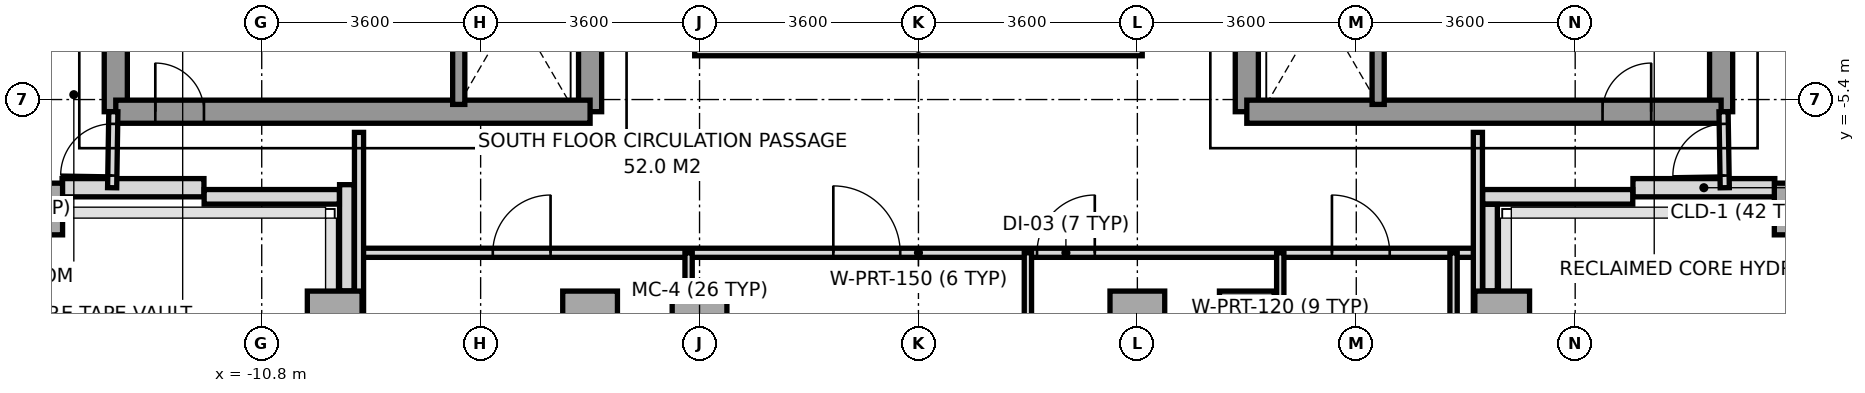
"""IFC4 building model, lengths in metres.
Left out: names, types, materials, properties, quantities, classifications, styles, units other than length and angle.
Written with IfcOpenShell. Run it as: python <this file> out.ifc"""

import sys

from ifc_helpers import new_model, si_unit, direction, frame, frame_2d, origin, origin_2d, place, context, subcontext, project, spatial, rectangle, extrude, source, transform, mapped, element, fill, save


model = new_model("IFC4")
c1 = context("Model", 3, precision=1e-05, world=origin(), true_north=direction((0.0, 1.0)))
c2 = subcontext(c1, "Body", "Model", "MODEL_VIEW")
j1 = project(units=[si_unit("LENGTHUNIT", "METRE"), si_unit("PLANEANGLEUNIT", "RADIAN")], contexts=[c1])
p1 = place(None, origin())
s1 = spatial("IfcSite", under=j1, at=p1, CompositionType="ELEMENT")
p2 = place(p1, origin())
s2 = spatial("IfcBuilding", under=s1, at=p2, CompositionType="ELEMENT")
p3 = place(p2, frame((0.0, 0.0, 180.8)))
s3 = spatial("IfcBuildingStorey", under=s2, at=p3, CompositionType="ELEMENT", Elevation=180.8)
m1 = source(origin(), c2, "Body", "SweptSolid", [
    extrude(rectangle(XDim=0.65, YDim=0.85, at=origin_2d()), origin(), (0.0, 0.0, 1.0), 3.2),
])
p4 = place(p3, frame((-14.4, -7.2, 0.0), z_axis=(0.0, 0.0, 1.0), x_axis=(1.0, 0.0, 0.0)))
e1 = element("IfcColumn", 1, at=p4, inside=s3, PredefinedType="COLUMN", context=c2, shape_type="MappedRepresentation", body=[
    mapped(m1, transform((0.0, 0.0, 0.0), x_axis=(1.0, 0.0, 0.0), y_axis=(0.0, 1.0, 0.0), z_axis=(0.0, 0.0, 1.0), scale=1.0)),
])
m2 = source(origin(), c2, "Body", "SweptSolid", [
    extrude(rectangle(XDim=0.9, YDim=0.9, at=origin_2d()), origin(), (0.0, 0.0, 1.0), 3.2),
])
for number, where, z_axis, x_axis in (
    (2, (-9.6, -9.0, 0.0), (0.0, 0.0, 1.0), (1.0, 0.0, 0.0)),
    (3, (-5.4, -9.0, 0.0), (0.0, 0.0, 1.0), (1.0, 0.0, 0.0)),
    (4, (-3.6, -9.0, 0.0), (0.0, 0.0, 1.0), (1.0, 0.0, 0.0)),
    (5, (3.6, -9.0, 0.0), (0.0, 0.0, 1.0), (1.0, 0.0, 0.0)),
    (6, (5.4, -9.0, 0.0), (0.0, 0.0, 1.0), (1.0, 0.0, 0.0)),
    (7, (9.6, -9.0, 0.0), (0.0, 0.0, 1.0), (1.0, 0.0, 0.0)),
):
    element("IfcColumn", number, at=place(p3, frame(where, z_axis=z_axis, x_axis=x_axis)), inside=s3, PredefinedType="COLUMN", context=c2, shape_type="MappedRepresentation", body=[
        mapped(m2, transform((0.0, 0.0, 0.0), x_axis=(1.0, 0.0, 0.0), y_axis=(0.0, 1.0, 0.0), z_axis=(0.0, 0.0, 1.0), scale=1.0)),
    ])
p5 = place(p3, frame((14.4, -7.2, 0.0), z_axis=(0.0, 0.0, 1.0), x_axis=(1.0, 0.0, 0.0)))
e8 = element("IfcColumn", 8, at=p5, inside=s3, PredefinedType="COLUMN", context=c2, shape_type="MappedRepresentation", body=[
    mapped(m1, transform((0.0, 0.0, 0.0), x_axis=(1.0, 0.0, 0.0), y_axis=(0.0, 1.0, 0.0), z_axis=(0.0, 0.0, 1.0), scale=1.0)),
])
for number, where, z_axis, x_axis in (
    (9, (-14.083, -6.85, 0.0), (0.0, 0.0, 1.0), (1.0, 0.0, 0.0)),
    (10, (11.75, -6.85, 0.0), (0.0, 0.0, 1.0), (1.0, 0.0, 0.0)),
):
    element("IfcWall", number, at=place(p3, frame(where, z_axis=z_axis, x_axis=x_axis)), inside=s3, PredefinedType="SOLIDWALL", context=c2, shape_type="SweptSolid", body=[
        extrude(rectangle(XDim=2.333, YDim=0.3, at=frame_2d((1.167, 0.0))), origin(), (0.0, 0.0, 1.0), 3.2),
    ])
p6 = place(p3, frame((11.747, -7.0, 0.0), z_axis=(0.0, 0.0, 1.0), x_axis=(-1.0, 0.0, 0.0)))
e11 = element("IfcWall", 11, at=p6, inside=s3, PredefinedType="PARAPET", context=c2, shape_type="SweptSolid", body=[
    extrude(rectangle(XDim=2.469, YDim=0.24, at=frame_2d((1.234, 0.0))), origin(), (0.0, 0.0, 1.0), 1.15),
])
p7 = place(p3, frame((9.4, -7.123, 0.0), z_axis=(0.0, 0.0, 1.0), x_axis=(0.0, -1.0, 0.0)))
e12 = element("IfcWall", 12, at=p7, inside=s3, PredefinedType="PARAPET", context=c2, shape_type="SweptSolid", body=[
    extrude(rectangle(XDim=1.424, YDim=0.24, at=frame_2d((0.712, 0.0))), origin(), (0.0, 0.0, 1.0), 1.15),
])
p8 = place(p3, frame((-9.4, -8.547, 0.0), z_axis=(0.0, 0.0, 1.0), x_axis=(0.0, 1.0, 0.0)))
e13 = element("IfcWall", 13, at=p8, inside=s3, PredefinedType="PARAPET", context=c2, shape_type="SweptSolid", body=[
    extrude(rectangle(XDim=1.747, YDim=0.24, at=frame_2d((0.874, 0.0))), origin(), (0.0, 0.0, 1.0), 1.15),
])
p9 = place(p3, frame((-9.523, -7.0, 0.0), z_axis=(0.0, 0.0, 1.0), x_axis=(-1.0, 0.0, 0.0)))
e14 = element("IfcWall", 14, at=p9, inside=s3, PredefinedType="PARAPET", context=c2, shape_type="SweptSolid", body=[
    extrude(rectangle(XDim=2.224, YDim=0.24, at=frame_2d((1.112, 0.0))), origin(), (0.0, 0.0, 1.0), 1.15),
])
p10 = place(p3, frame((-13.2, -5.6, 0.0), z_axis=(0.0, 0.0, 1.0), x_axis=(0.0, 1.0, 0.0)))
e15 = element("IfcWall", 15, at=p10, inside=s3, PredefinedType="SHEAR", context=c2, shape_type="SweptSolid", body=[
    extrude(rectangle(XDim=11.2, YDim=0.38, at=frame_2d((5.6, 0.0))), origin(), (0.0, 0.0, 1.0), 3.2),
])
p11 = place(p3, frame((-5.4, -5.6, 0.0), z_axis=(0.0, 0.0, 1.0), x_axis=(0.0, 1.0, 0.0)))
e16 = element("IfcWall", 16, at=p11, inside=s3, PredefinedType="SHEAR", context=c2, shape_type="SweptSolid", body=[
    extrude(rectangle(XDim=12.5, YDim=0.38, at=frame_2d((6.25, 0.0))), origin(), (0.0, 0.0, 1.0), 3.2),
])
p12 = place(p11, frame((4.55, 0.0, 0.0)))
e17 = element("IfcOpeningElement", 17, at=p12, cuts=e16, PredefinedType="OPENING", context=c2, shape_type="SweptSolid", body=[
    extrude(rectangle(XDim=1.2, YDim=2.2, at=frame_2d((0.6, 1.1))), frame((0.0, 0.2, 0.0), z_axis=(0.0, -1.0, 0.0), x_axis=(1.0, 0.0, 0.0)), (0.0, 0.0, 1.0), 0.4),
])
p13 = place(p11, frame((10.45, 0.0, 0.0)))
e18 = element("IfcOpeningElement", 18, at=p13, cuts=e16, PredefinedType="OPENING", context=c2, shape_type="SweptSolid", body=[
    extrude(rectangle(XDim=1.2, YDim=2.2, at=frame_2d((0.6, 1.1))), frame((0.0, 0.2, 0.0), z_axis=(0.0, -1.0, 0.0), x_axis=(1.0, 0.0, 0.0)), (0.0, 0.0, 1.0), 0.4),
])
p14 = place(p11, frame((6.86, 0.0, 0.0)))
e19 = element("IfcOpeningElement", 19, at=p14, cuts=e16, PredefinedType="OPENING", context=c2, shape_type="SweptSolid", body=[
    extrude(rectangle(XDim=0.8, YDim=2.1, at=frame_2d((0.4, 1.05))), frame((0.0, 0.2, 0.0), z_axis=(0.0, -1.0, 0.0), x_axis=(1.0, 0.0, 0.0)), (0.0, 0.0, 1.0), 0.4),
])
p15 = place(p11, frame((7.88, 0.0, 0.0)))
e20 = element("IfcOpeningElement", 20, at=p15, cuts=e16, PredefinedType="OPENING", context=c2, shape_type="SweptSolid", body=[
    extrude(rectangle(XDim=0.8, YDim=2.1, at=frame_2d((0.4, 1.05))), frame((0.0, 0.2, 0.0), z_axis=(0.0, -1.0, 0.0), x_axis=(1.0, 0.0, 0.0)), (0.0, 0.0, 1.0), 0.4),
])
p16 = place(p3, frame((-13.2, -5.6, 0.0), z_axis=(0.0, 0.0, 1.0), x_axis=(1.0, 0.0, 0.0)))
e21 = element("IfcWall", 21, at=p16, inside=s3, PredefinedType="SHEAR", context=c2, shape_type="SweptSolid", body=[
    extrude(rectangle(XDim=7.8, YDim=0.38, at=frame_2d((3.9, 0.0))), origin(), (0.0, 0.0, 1.0), 3.2),
])
p17 = place(p16, frame((0.65, 0.0, 0.0)))
e22 = element("IfcOpeningElement", 22, at=p17, cuts=e21, PredefinedType="OPENING", context=c2, shape_type="SweptSolid", body=[
    extrude(rectangle(XDim=0.8, YDim=2.1, at=frame_2d((0.4, 1.05))), frame((0.0, 0.2, 0.0), z_axis=(0.0, -1.0, 0.0), x_axis=(1.0, 0.0, 0.0)), (0.0, 0.0, 1.0), 0.4),
])
p18 = place(p3, frame((13.2, -5.6, 0.0), z_axis=(0.0, 0.0, 1.0), x_axis=(0.0, 1.0, 0.0)))
e23 = element("IfcWall", 23, at=p18, inside=s3, PredefinedType="SHEAR", context=c2, shape_type="SweptSolid", body=[
    extrude(rectangle(XDim=11.2, YDim=0.38, at=frame_2d((5.6, 0.0))), origin(), (0.0, 0.0, 1.0), 3.2),
])
p19 = place(p3, frame((5.4, -5.6, 0.0), z_axis=(0.0, 0.0, 1.0), x_axis=(0.0, 1.0, 0.0)))
e24 = element("IfcWall", 24, at=p19, inside=s3, PredefinedType="SHEAR", context=c2, shape_type="SweptSolid", body=[
    extrude(rectangle(XDim=12.5, YDim=0.38, at=frame_2d((6.25, 0.0))), origin(), (0.0, 0.0, 1.0), 3.2),
])
p20 = place(p19, frame((4.55, 0.0, 0.0)))
e25 = element("IfcOpeningElement", 25, at=p20, cuts=e24, PredefinedType="OPENING", context=c2, shape_type="SweptSolid", body=[
    extrude(rectangle(XDim=1.2, YDim=2.2, at=frame_2d((0.6, 1.1))), frame((0.0, 0.2, 0.0), z_axis=(0.0, -1.0, 0.0), x_axis=(1.0, 0.0, 0.0)), (0.0, 0.0, 1.0), 0.4),
])
p21 = place(p19, frame((10.45, 0.0, 0.0)))
e26 = element("IfcOpeningElement", 26, at=p21, cuts=e24, PredefinedType="OPENING", context=c2, shape_type="SweptSolid", body=[
    extrude(rectangle(XDim=1.2, YDim=2.2, at=frame_2d((0.6, 1.1))), frame((0.0, 0.2, 0.0), z_axis=(0.0, -1.0, 0.0), x_axis=(1.0, 0.0, 0.0)), (0.0, 0.0, 1.0), 0.4),
])
p22 = place(p3, frame((5.4, -5.6, 0.0), z_axis=(0.0, 0.0, 1.0), x_axis=(1.0, 0.0, 0.0)))
e27 = element("IfcWall", 27, at=p22, inside=s3, PredefinedType="SHEAR", context=c2, shape_type="SweptSolid", body=[
    extrude(rectangle(XDim=7.8, YDim=0.38, at=frame_2d((3.9, 0.0))), origin(), (0.0, 0.0, 1.0), 3.2),
])
p23 = place(p22, frame((5.85, 0.0, 0.0)))
e28 = element("IfcOpeningElement", 28, at=p23, cuts=e27, PredefinedType="OPENING", context=c2, shape_type="SweptSolid", body=[
    extrude(rectangle(XDim=0.8, YDim=2.1, at=frame_2d((0.4, 1.05))), frame((0.0, 0.2, 0.0), z_axis=(0.0, -1.0, 0.0), x_axis=(1.0, 0.0, 0.0)), (0.0, 0.0, 1.0), 0.4),
])
for number, where, z_axis, x_axis in (
    (29, (-7.56, -5.48, 0.0), (0.0, 0.0, 1.0), (0.0, 1.0, 0.0)),
    (30, (7.56, -5.48, 0.0), (0.0, 0.0, 1.0), (0.0, 1.0, 0.0)),
):
    element("IfcWall", number, at=place(p3, frame(where, z_axis=z_axis, x_axis=x_axis)), inside=s3, PredefinedType="SOLIDWALL", context=c2, shape_type="SweptSolid", body=[
        extrude(rectangle(XDim=1.6, YDim=0.2, at=frame_2d((0.8, 0.0))), origin(), (0.0, 0.0, 1.0), 3.2),
    ])
p24 = place(p3, frame((-9.2, -7.92, 0.0), z_axis=(0.0, 0.0, 1.0), x_axis=(1.0, 0.0, 0.0)))
e31 = element("IfcWall", 31, at=p24, inside=s3, PredefinedType="PARTITIONING", context=c2, shape_type="SweptSolid", body=[
    extrude(rectangle(XDim=18.4, YDim=0.15, at=frame_2d((9.2, 0.0))), origin(), (0.0, 0.0, 1.0), 2.8),
])
p25 = place(p24, frame((16.0, 0.0, 0.0)))
e32 = element("IfcOpeningElement", 32, at=p25, cuts=e31, PredefinedType="OPENING", context=c2, shape_type="SweptSolid", body=[
    extrude(rectangle(XDim=0.95, YDim=2.15, at=frame_2d((0.475, 1.075))), frame((0.0, 0.085, 0.0), z_axis=(0.0, -1.0, 0.0), x_axis=(1.0, 0.0, 0.0)), (0.0, 0.0, 1.0), 0.17),
])
p26 = place(p24, frame((2.2, 0.0, 0.0)))
e33 = element("IfcOpeningElement", 33, at=p26, cuts=e31, PredefinedType="OPENING", context=c2, shape_type="SweptSolid", body=[
    extrude(rectangle(XDim=0.95, YDim=2.15, at=frame_2d((0.475, 1.075))), frame((0.0, 0.085, 0.0), z_axis=(0.0, -1.0, 0.0), x_axis=(1.0, 0.0, 0.0)), (0.0, 0.0, 1.0), 0.17),
])
p27 = place(p24, frame((7.8, 0.0, 0.0)))
e34 = element("IfcOpeningElement", 34, at=p27, cuts=e31, PredefinedType="OPENING", context=c2, shape_type="SweptSolid", body=[
    extrude(rectangle(XDim=1.1, YDim=2.2, at=frame_2d((0.55, 1.1))), frame((0.0, 0.085, 0.0), z_axis=(0.0, -1.0, 0.0), x_axis=(1.0, 0.0, 0.0)), (0.0, 0.0, 1.0), 0.17),
])
p28 = place(p24, frame((11.15, 0.0, 0.0)))
e35 = element("IfcOpeningElement", 35, at=p28, cuts=e31, PredefinedType="OPENING", context=c2, shape_type="SweptSolid", body=[
    extrude(rectangle(XDim=0.95, YDim=2.15, at=frame_2d((0.475, 1.075))), frame((0.0, 0.085, 0.0), z_axis=(0.0, -1.0, 0.0), x_axis=(1.0, 0.0, 0.0)), (0.0, 0.0, 1.0), 0.17),
])
for number, where, z_axis, x_axis in (
    (36, (-9.2, -15.68, 0.0), (0.0, 0.0, 1.0), (0.0, 1.0, 0.0)),
    (37, (9.2, -15.68, 0.0), (0.0, 0.0, 1.0), (0.0, 1.0, 0.0)),
):
    element("IfcWall", number, at=place(p3, frame(where, z_axis=z_axis, x_axis=x_axis)), inside=s3, PredefinedType="PARTITIONING", context=c2, shape_type="SweptSolid", body=[
        extrude(rectangle(XDim=9.74, YDim=0.15, at=frame_2d((4.87, 0.0))), origin(), (0.0, 0.0, 1.0), 2.75),
    ])
for number, where, z_axis, x_axis in (
    (38, (-3.78, -24.65, 0.0), (0.0, 0.0, 1.0), (0.0, 1.0, 0.0)),
    (39, (1.8, -24.65, 0.0), (0.0, 0.0, 1.0), (0.0, 1.0, 0.0)),
):
    element("IfcWall", number, at=place(p3, frame(where, z_axis=z_axis, x_axis=x_axis)), inside=s3, PredefinedType="PARTITIONING", context=c2, shape_type="SweptSolid", body=[
        extrude(rectangle(XDim=16.73, YDim=0.12, at=frame_2d((8.365, 0.0))), origin(), (0.0, 0.0, 1.0), 2.75),
    ])
for number, where, z_axis, x_axis in (
    (40, (5.95, -11.42, 0.0), (0.0, 0.0, 1.0), (0.0, 1.0, 0.0)),
    (41, (8.8, -11.42, 0.0), (0.0, 0.0, 1.0), (0.0, 1.0, 0.0)),
):
    element("IfcWall", number, at=place(p3, frame(where, z_axis=z_axis, x_axis=x_axis)), inside=s3, PredefinedType="PARTITIONING", context=c2, shape_type="SweptSolid", body=[
        extrude(rectangle(XDim=3.5, YDim=0.12, at=frame_2d((1.75, 0.0))), origin(), (0.0, 0.0, 1.0), 2.75),
    ])
p29 = place(p3, frame((-13.26, -6.85, 0.0), z_axis=(0.0, 0.0, 1.0), x_axis=(0.016013571389, 0.999871774545, 0.0)))
e42 = element("IfcWall", 42, at=p29, inside=s3, PredefinedType="PARTITIONING", context=c2, shape_type="SweptSolid", body=[
    extrude(rectangle(XDim=1.25, YDim=0.15, at=frame_2d((0.625, 0.0))), origin(), (0.0, 0.0, 1.0), 3.2),
])
p30 = place(p29, frame((0.2, 0.0, 0.0)))
e43 = element("IfcOpeningElement", 43, at=p30, cuts=e42, PredefinedType="OPENING", context=c2, shape_type="SweptSolid", body=[
    extrude(rectangle(XDim=0.85, YDim=2.1, at=frame_2d((0.425, 1.05))), frame((0.0, 0.085, 0.0), z_axis=(0.0, -1.0, 0.0), x_axis=(1.0, 0.0, 0.0)), (0.0, 0.0, 1.0), 0.17),
])
p31 = place(p3, frame((13.26, -6.85, 0.0), z_axis=(0.0, 0.0, 1.0), x_axis=(-0.016013571389, 0.999871774545, 0.0)))
e44 = element("IfcWall", 44, at=p31, inside=s3, PredefinedType="PARTITIONING", context=c2, shape_type="SweptSolid", body=[
    extrude(rectangle(XDim=1.25, YDim=0.15, at=frame_2d((0.625, 0.0))), origin(), (0.0, 0.0, 1.0), 3.2),
])
p32 = place(p31, frame((0.2, 0.0, 0.0)))
e45 = element("IfcOpeningElement", 45, at=p32, cuts=e44, PredefinedType="OPENING", context=c2, shape_type="SweptSolid", body=[
    extrude(rectangle(XDim=0.85, YDim=2.1, at=frame_2d((0.425, 1.05))), frame((0.0, 0.085, 0.0), z_axis=(0.0, -1.0, 0.0), x_axis=(1.0, 0.0, 0.0)), (0.0, 0.0, 1.0), 0.17),
])
p33 = place(p3, frame((-3.68, -4.56, 0.0), z_axis=(0.0, 0.0, 1.0), x_axis=(1.0, 0.0, 0.0)))
e46 = element("IfcWall", 46, at=p33, inside=s3, PredefinedType="PARAPET", context=c2, shape_type="SweptSolid", body=[
    extrude(rectangle(XDim=7.36, YDim=0.24, at=frame_2d((3.68, 0.0))), origin(), (0.0, 0.0, 1.0), 1.15),
])
m3 = source(origin(), c2, "Body", "SweptSolid", [
    extrude(rectangle(XDim=0.8, YDim=2.1, at=frame_2d((0.4, 1.05))), frame((0.0, 0.025, 0.0), z_axis=(0.0, -1.0, 0.0), x_axis=(1.0, 0.0, 0.0)), (0.0, 0.0, 1.0), 0.05),
])
p34 = place(p17, origin())
e47 = element("IfcDoor", 47, at=p34, inside=s3, OperationType="SINGLE_SWING_LEFT", PredefinedType="DOOR", context=c2, shape_type="MappedRepresentation", body=[
    mapped(m3, transform((0.0, 0.0, 0.0), x_axis=(1.0, 0.0, 0.0), y_axis=(0.0, 1.0, 0.0), z_axis=(0.0, 0.0, 1.0), scale=1.0)),
])
fill(e22, e47)
p35 = place(p23, origin())
e48 = element("IfcDoor", 48, at=p35, inside=s3, OperationType="SINGLE_SWING_RIGHT", PredefinedType="DOOR", context=c2, shape_type="MappedRepresentation", body=[
    mapped(m3, transform((0.0, 0.0, 0.0), x_axis=(1.0, 0.0, 0.0), y_axis=(0.0, 1.0, 0.0), z_axis=(0.0, 0.0, 1.0), scale=1.0)),
])
fill(e28, e48)
m4 = source(origin(), c2, "Body", "SweptSolid", [
    extrude(rectangle(XDim=0.95, YDim=2.15, at=frame_2d((0.475, 1.075))), frame((0.0, 0.025, 0.0), z_axis=(0.0, -1.0, 0.0), x_axis=(1.0, 0.0, 0.0)), (0.0, 0.0, 1.0), 0.05),
])
p36 = place(p25, origin())
e49 = element("IfcDoor", 49, at=p36, inside=s3, OperationType="SINGLE_SWING_LEFT", PredefinedType="DOOR", context=c2, shape_type="MappedRepresentation", body=[
    mapped(m4, transform((0.0, 0.0, 0.0), x_axis=(1.0, 0.0, 0.0), y_axis=(0.0, 1.0, 0.0), z_axis=(0.0, 0.0, 1.0), scale=1.0)),
])
fill(e32, e49)
p37 = place(p26, origin())
e50 = element("IfcDoor", 50, at=p37, inside=s3, OperationType="SINGLE_SWING_RIGHT", PredefinedType="DOOR", context=c2, shape_type="MappedRepresentation", body=[
    mapped(m4, transform((0.0, 0.0, 0.0), x_axis=(1.0, 0.0, 0.0), y_axis=(0.0, 1.0, 0.0), z_axis=(0.0, 0.0, 1.0), scale=1.0)),
])
fill(e33, e50)
m5 = source(origin(), c2, "Body", "SweptSolid", [
    extrude(rectangle(XDim=1.1, YDim=2.2, at=frame_2d((0.55, 1.1))), frame((0.0, 0.025, 0.0), z_axis=(0.0, -1.0, 0.0), x_axis=(1.0, 0.0, 0.0)), (0.0, 0.0, 1.0), 0.05),
])
p38 = place(p27, origin())
e51 = element("IfcDoor", 51, at=p38, inside=s3, OperationType="SINGLE_SWING_LEFT", PredefinedType="DOOR", context=c2, shape_type="MappedRepresentation", body=[
    mapped(m5, transform((0.0, 0.0, 0.0), x_axis=(1.0, 0.0, 0.0), y_axis=(0.0, 1.0, 0.0), z_axis=(0.0, 0.0, 1.0), scale=1.0)),
])
fill(e34, e51)
p39 = place(p28, origin())
e52 = element("IfcDoor", 52, at=p39, inside=s3, OperationType="SINGLE_SWING_RIGHT", PredefinedType="DOOR", context=c2, shape_type="MappedRepresentation", body=[
    mapped(m4, transform((0.0, 0.0, 0.0), x_axis=(1.0, 0.0, 0.0), y_axis=(0.0, 1.0, 0.0), z_axis=(0.0, 0.0, 1.0), scale=1.0)),
])
fill(e35, e52)
m6 = source(origin(), c2, "Body", "SweptSolid", [
    extrude(rectangle(XDim=0.85, YDim=2.1, at=frame_2d((0.425, 1.05))), frame((0.0, 0.025, 0.0), z_axis=(0.0, -1.0, 0.0), x_axis=(1.0, 0.0, 0.0)), (0.0, 0.0, 1.0), 0.05),
])
p40 = place(p30, origin())
e53 = element("IfcDoor", 53, at=p40, inside=s3, OperationType="SINGLE_SWING_LEFT", PredefinedType="DOOR", context=c2, shape_type="MappedRepresentation", body=[
    mapped(m6, transform((0.0, 0.0, 0.0), x_axis=(1.0, 0.0, 0.0), y_axis=(0.0, 1.0, 0.0), z_axis=(0.0, 0.0, 1.0), scale=1.0)),
])
fill(e43, e53)
p41 = place(p32, origin())
e54 = element("IfcDoor", 54, at=p41, inside=s3, OperationType="SINGLE_SWING_LEFT", PredefinedType="DOOR", context=c2, shape_type="MappedRepresentation", body=[
    mapped(m6, transform((0.0, 0.0, 0.0), x_axis=(1.0, 0.0, 0.0), y_axis=(0.0, 1.0, 0.0), z_axis=(0.0, 0.0, 1.0), scale=1.0)),
])
fill(e45, e54)
save(model, sys.argv[1])
